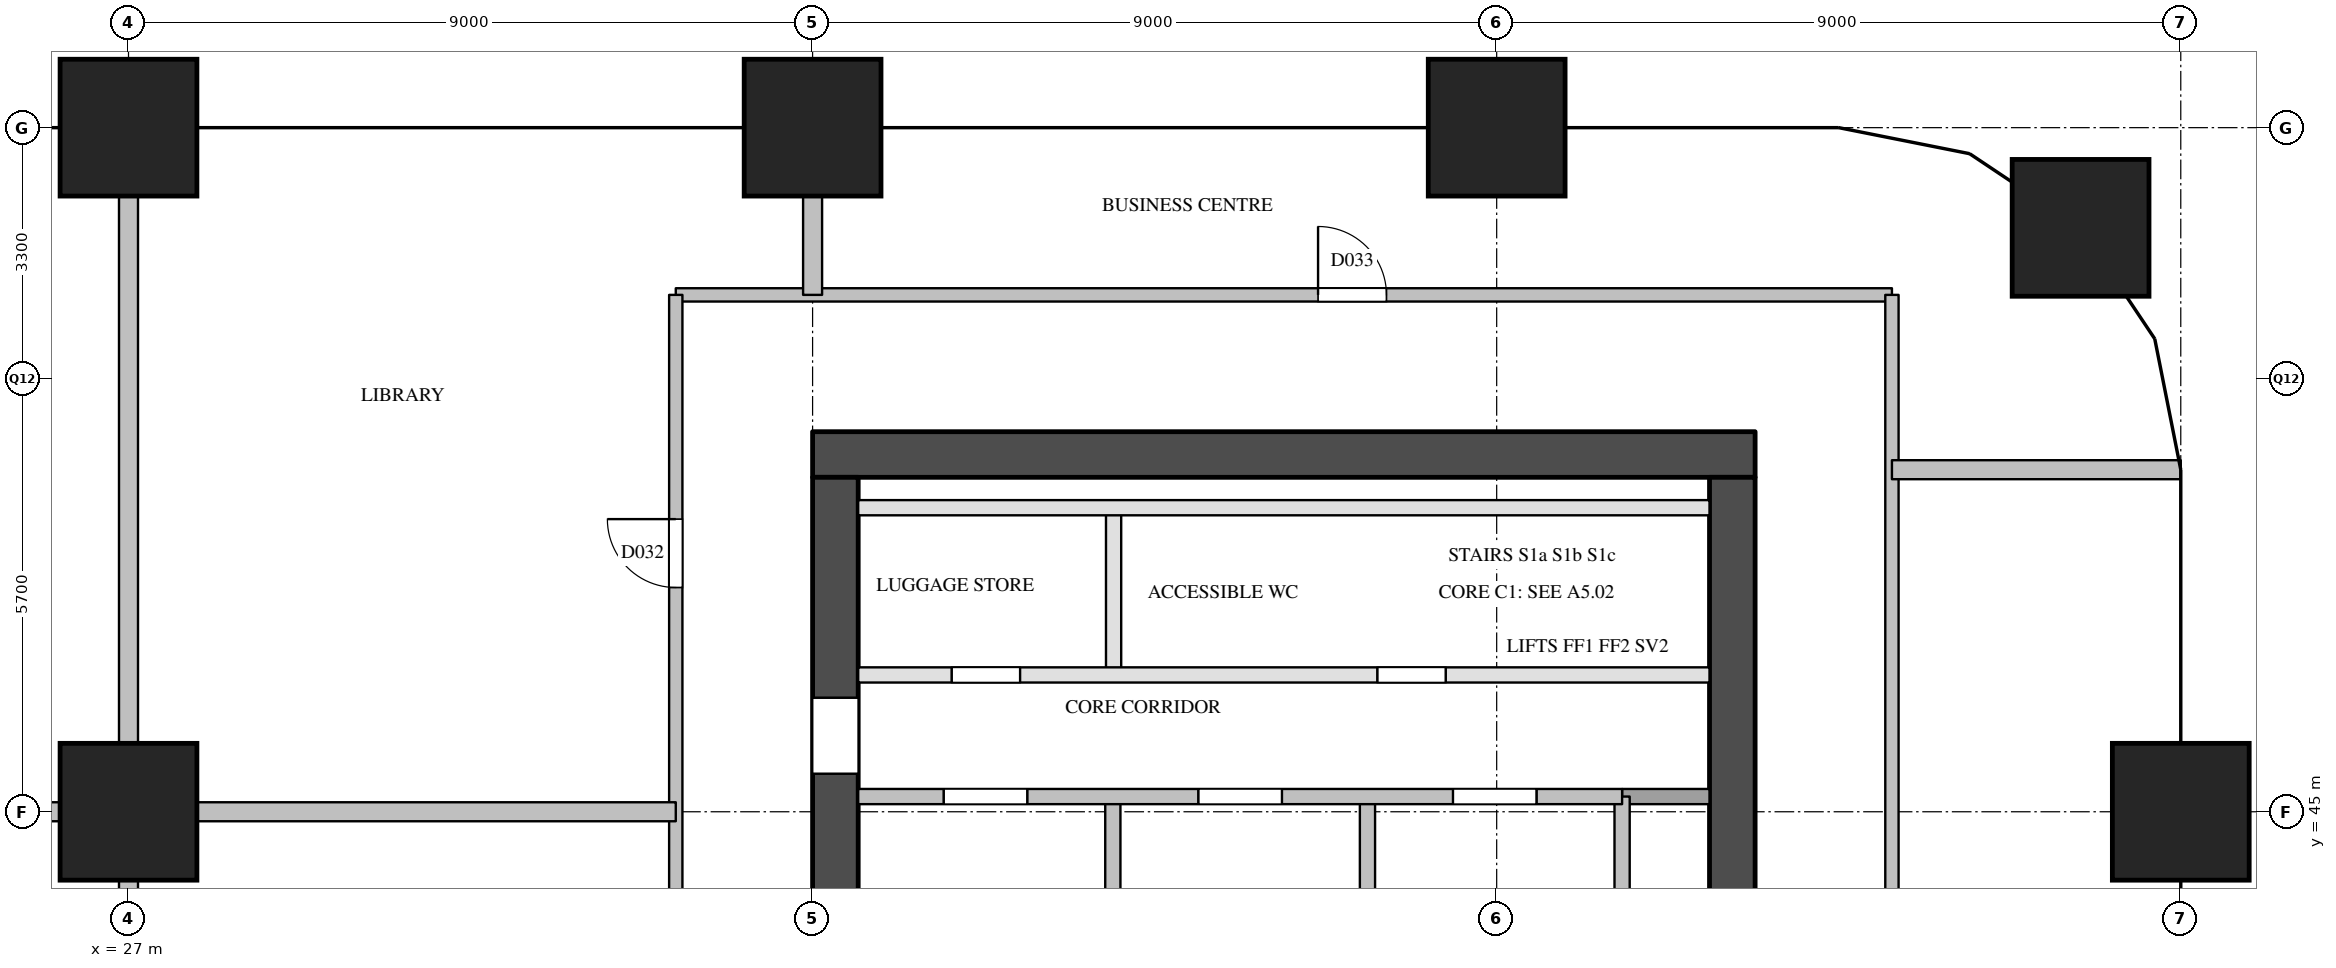
"""IFC4 building model, lengths in metres.
Left out: names, types, materials, properties, quantities, classifications, styles, units other than length and angle.
Written with IfcOpenShell. Run it as: python <this file> out.ifc"""

import sys

from ifc_helpers import new_model, si_unit, direction, frame, frame_2d, origin, origin_2d, place, context, subcontext, project, spatial, rectangle, extrude, element, fill, save


model = new_model("IFC4")
c1 = context("Model", 3, precision=1e-05, world=origin(), true_north=direction((0.0, 1.0)))
c2 = subcontext(c1, "Body", "Model", "MODEL_VIEW")
j1 = project(units=[si_unit("LENGTHUNIT", "METRE"), si_unit("PLANEANGLEUNIT", "RADIAN")], contexts=[c1])
p1 = place(None, origin())
s1 = spatial("IfcSite", under=j1, at=p1, CompositionType="ELEMENT")
p2 = place(p1, origin())
s2 = spatial("IfcBuilding", under=s1, at=p2, CompositionType="ELEMENT")
p3 = place(p2, frame((0.0, 0.0, 104.4)))
s3 = spatial("IfcBuildingStorey", under=s2, at=p3, CompositionType="ELEMENT", Elevation=104.4)
for number, where, z_axis, x_axis in (
    (1, (27.0, 45.0, 0.0), (0.0, 0.0, 1.0), (1.0, 0.0, 0.0)),
    (2, (27.0, 54.0, 0.0), (0.0, 0.0, 1.0), (1.0, 0.0, 0.0)),
    (3, (36.0, 54.0, 0.0), (0.0, 0.0, 1.0), (1.0, 0.0, 0.0)),
    (4, (45.0, 54.0, 0.0), (0.0, 0.0, 1.0), (1.0, 0.0, 0.0)),
    (5, (54.0, 45.0, 0.0), (0.0, 0.0, 1.0), (1.0, 0.0, 0.0)),
    (6, (52.682, 52.682, 0.0), (0.0, 0.0, 1.0), (1.0, 0.0, 0.0)),
):
    element("IfcColumn", number, at=place(p3, frame(where, z_axis=z_axis, x_axis=x_axis)), inside=s3, PredefinedType="COLUMN", context=c2, shape_type="SweptSolid", body=[
        extrude(rectangle(XDim=1.8, YDim=1.8, at=origin_2d()), origin(), (0.0, 0.0, 1.0), 3.8),
    ])
p4 = place(p3, frame((36.0, 49.7, 0.0), z_axis=(0.0, 0.0, 1.0), x_axis=(1.0, 0.0, 0.0)))
e7 = element("IfcWall", 7, at=p4, inside=s3, PredefinedType="SHEAR", context=c2, shape_type="SweptSolid", body=[
    extrude(rectangle(XDim=12.4, YDim=0.6, at=frame_2d((6.2, 0.0))), origin(), (0.0, 0.0, 1.0), 3.5),
])
p5 = place(p3, frame((36.3, 29.1, 0.0), z_axis=(0.0, 0.0, 1.0), x_axis=(0.0, 1.0, 0.0)))
e8 = element("IfcWall", 8, at=p5, inside=s3, PredefinedType="SHEAR", context=c2, shape_type="SweptSolid", body=[
    extrude(rectangle(XDim=20.3, YDim=0.6, at=frame_2d((10.15, 0.0))), origin(), (0.0, 0.0, 1.0), 3.5),
])
p6 = place(p5, frame((3.6, 0.0, 0.0)))
e9 = element("IfcOpeningElement", 9, at=p6, cuts=e8, PredefinedType="OPENING", context=c2, shape_type="SweptSolid", body=[
    extrude(rectangle(XDim=1.8, YDim=2.1, at=frame_2d((0.9, 1.05))), frame((0.0, 0.31, 0.0), z_axis=(0.0, -1.0, 0.0), x_axis=(1.0, 0.0, 0.0)), (0.0, 0.0, 1.0), 0.62),
])
p7 = place(p5, frame((16.4, 0.0, 0.0)))
e10 = element("IfcOpeningElement", 10, at=p7, cuts=e8, PredefinedType="OPENING", context=c2, shape_type="SweptSolid", body=[
    extrude(rectangle(XDim=1.0, YDim=2.1, at=frame_2d((0.5, 1.05))), frame((0.0, 0.31, 0.0), z_axis=(0.0, -1.0, 0.0), x_axis=(1.0, 0.0, 0.0)), (0.0, 0.0, 1.0), 0.62),
])
p8 = place(p3, frame((48.1, 29.1, 0.0), z_axis=(0.0, 0.0, 1.0), x_axis=(0.0, 1.0, 0.0)))
e11 = element("IfcWall", 11, at=p8, inside=s3, PredefinedType="SHEAR", context=c2, shape_type="SweptSolid", body=[
    extrude(rectangle(XDim=20.3, YDim=0.6, at=frame_2d((10.15, 0.0))), origin(), (0.0, 0.0, 1.0), 3.5),
])
p9 = place(p8, frame((12.5, 0.0, 0.0)))
e12 = element("IfcOpeningElement", 12, at=p9, cuts=e11, PredefinedType="OPENING", context=c2, shape_type="SweptSolid", body=[
    extrude(rectangle(XDim=0.7, YDim=2.1, at=frame_2d((0.35, 1.05))), frame((0.0, 0.31, 0.0), z_axis=(0.0, -1.0, 0.0), x_axis=(1.0, 0.0, 0.0)), (0.0, 0.0, 1.0), 0.62),
])
p10 = place(p8, frame((3.9, 0.0, 0.0)))
e13 = element("IfcOpeningElement", 13, at=p10, cuts=e11, PredefinedType="OPENING", context=c2, shape_type="SweptSolid", body=[
    extrude(rectangle(XDim=1.8, YDim=2.1, at=frame_2d((0.9, 1.05))), frame((0.0, 0.31, 0.0), z_axis=(0.0, -1.0, 0.0), x_axis=(1.0, 0.0, 0.0)), (0.0, 0.0, 1.0), 0.62),
])
p11 = place(p3, frame((39.95, 40.78, 0.0), z_axis=(0.0, 0.0, 1.0), x_axis=(0.0, 1.0, 0.0)))
e14 = element("IfcWall", 14, at=p11, inside=s3, PredefinedType="SOLIDWALL", context=c2, shape_type="SweptSolid", body=[
    extrude(rectangle(XDim=4.42, YDim=0.2, at=frame_2d((2.21, 0.0))), origin(), (0.0, 0.0, 1.0), 3.5),
])
p12 = place(p3, frame((39.96, 46.8, 0.0), z_axis=(0.0, 0.0, 1.0), x_axis=(0.0, 1.0, 0.0)))
e15 = element("IfcWall", 15, at=p12, inside=s3, PredefinedType="PARTITIONING", context=c2, shape_type="SweptSolid", body=[
    extrude(rectangle(XDim=2.2, YDim=0.2, at=frame_2d((1.1, 0.0))), origin(), (0.0, 0.0, 1.0), 3.5),
])
for number, where, z_axis, x_axis in (
    (16, (43.3, 40.78, 0.0), (0.0, 0.0, 1.0), (0.0, 1.0, 0.0)),
    (17, (46.65, 40.78, 0.0), (0.0, 0.0, 1.0), (0.0, 1.0, 0.0)),
):
    element("IfcWall", number, at=place(p3, frame(where, z_axis=z_axis, x_axis=x_axis)), inside=s3, PredefinedType="SOLIDWALL", context=c2, shape_type="SweptSolid", body=[
        extrude(rectangle(XDim=4.42, YDim=0.2, at=frame_2d((2.21, 0.0))), origin(), (0.0, 0.0, 1.0), 3.5),
    ])
p13 = place(p3, frame((46.65, 45.2, 0.0), z_axis=(0.0, 0.0, 1.0), x_axis=(1.0, 0.0, 0.0)))
e18 = element("IfcWall", 18, at=p13, inside=s3, PredefinedType="SOLIDWALL", context=c2, shape_type="SweptSolid", body=[
    extrude(rectangle(XDim=1.15, YDim=0.2, at=frame_2d((0.575, 0.0))), origin(), (0.0, 0.0, 1.0), 3.5),
])
p14 = place(p3, frame((36.6, 45.2, 0.0), z_axis=(0.0, 0.0, 1.0), x_axis=(1.0, 0.0, 0.0)))
e19 = element("IfcWall", 19, at=p14, inside=s3, PredefinedType="SOLIDWALL", context=c2, shape_type="SweptSolid", body=[
    extrude(rectangle(XDim=10.05, YDim=0.2, at=frame_2d((5.025, 0.0))), origin(), (0.0, 0.0, 1.0), 3.5),
])
p15 = place(p14, frame((1.125, 0.0, 0.0)))
e20 = element("IfcOpeningElement", 20, at=p15, cuts=e19, PredefinedType="OPENING", context=c2, shape_type="SweptSolid", body=[
    extrude(rectangle(XDim=1.1, YDim=2.1, at=frame_2d((0.55, 1.05))), frame((0.0, 0.11, 0.0), z_axis=(0.0, -1.0, 0.0), x_axis=(1.0, 0.0, 0.0)), (0.0, 0.0, 1.0), 0.22),
])
p16 = place(p14, frame((4.475, 0.0, 0.0)))
e21 = element("IfcOpeningElement", 21, at=p16, cuts=e19, PredefinedType="OPENING", context=c2, shape_type="SweptSolid", body=[
    extrude(rectangle(XDim=1.1, YDim=2.1, at=frame_2d((0.55, 1.05))), frame((0.0, 0.11, 0.0), z_axis=(0.0, -1.0, 0.0), x_axis=(1.0, 0.0, 0.0)), (0.0, 0.0, 1.0), 0.22),
])
p17 = place(p14, frame((7.825, 0.0, 0.0)))
e22 = element("IfcOpeningElement", 22, at=p17, cuts=e19, PredefinedType="OPENING", context=c2, shape_type="SweptSolid", body=[
    extrude(rectangle(XDim=1.1, YDim=2.1, at=frame_2d((0.55, 1.05))), frame((0.0, 0.11, 0.0), z_axis=(0.0, -1.0, 0.0), x_axis=(1.0, 0.0, 0.0)), (0.0, 0.0, 1.0), 0.22),
])
p18 = place(p3, frame((36.6, 46.8, 0.0), z_axis=(0.0, 0.0, 1.0), x_axis=(1.0, 0.0, 0.0)))
e23 = element("IfcWall", 23, at=p18, inside=s3, PredefinedType="PARTITIONING", context=c2, shape_type="SweptSolid", body=[
    extrude(rectangle(XDim=11.2, YDim=0.2, at=frame_2d((5.6, 0.0))), origin(), (0.0, 0.0, 1.0), 3.5),
])
p19 = place(p18, frame((1.23, 0.0, 0.0)))
e24 = element("IfcOpeningElement", 24, at=p19, cuts=e23, PredefinedType="OPENING", context=c2, shape_type="SweptSolid", body=[
    extrude(rectangle(XDim=0.9, YDim=2.1, at=frame_2d((0.45, 1.05))), frame((0.0, 0.11, 0.0), z_axis=(0.0, -1.0, 0.0), x_axis=(1.0, 0.0, 0.0)), (0.0, 0.0, 1.0), 0.22),
])
p20 = place(p18, frame((6.83, 0.0, 0.0)))
e25 = element("IfcOpeningElement", 25, at=p20, cuts=e23, PredefinedType="OPENING", context=c2, shape_type="SweptSolid", body=[
    extrude(rectangle(XDim=0.9, YDim=2.1, at=frame_2d((0.45, 1.05))), frame((0.0, 0.11, 0.0), z_axis=(0.0, -1.0, 0.0), x_axis=(1.0, 0.0, 0.0)), (0.0, 0.0, 1.0), 0.22),
])
p21 = place(p3, frame((36.6, 49.0, 0.0), z_axis=(0.0, 0.0, 1.0), x_axis=(1.0, 0.0, 0.0)))
e26 = element("IfcWall", 26, at=p21, inside=s3, PredefinedType="PARTITIONING", context=c2, shape_type="SweptSolid", body=[
    extrude(rectangle(XDim=11.2, YDim=0.2, at=frame_2d((5.6, 0.0))), origin(), (0.0, 0.0, 1.0), 3.5),
])
p22 = place(p3, frame((34.2, 51.8, 0.0), z_axis=(0.0, 0.0, 1.0), x_axis=(1.0, 0.0, 0.0)))
e27 = element("IfcWall", 27, at=p22, inside=s3, PredefinedType="PARTITIONING", context=c2, shape_type="SweptSolid", body=[
    extrude(rectangle(XDim=16.0, YDim=0.175, at=frame_2d((8.0, 0.0))), origin(), (0.0, 0.0, 1.0), 3.5),
])
p23 = place(p22, frame((8.45, 0.0, 0.0)))
e28 = element("IfcOpeningElement", 28, at=p23, cuts=e27, PredefinedType="OPENING", context=c2, shape_type="SweptSolid", body=[
    extrude(rectangle(XDim=0.9, YDim=2.1, at=frame_2d((0.45, 1.05))), frame((0.0, 0.097, 0.0), z_axis=(0.0, -1.0, 0.0), x_axis=(1.0, 0.0, 0.0)), (0.0, 0.0, 1.0), 0.195),
])
p24 = place(p3, frame((34.2, 29.12, 0.0), z_axis=(0.0, 0.0, 1.0), x_axis=(0.0, 1.0, 0.0)))
e29 = element("IfcWall", 29, at=p24, inside=s3, PredefinedType="PARTITIONING", context=c2, shape_type="SweptSolid", body=[
    extrude(rectangle(XDim=22.68, YDim=0.175, at=frame_2d((11.34, 0.0))), origin(), (0.0, 0.0, 1.0), 3.5),
])
p25 = place(p24, frame((3.08, 0.0, 0.0)))
e30 = element("IfcOpeningElement", 30, at=p25, cuts=e29, PredefinedType="OPENING", context=c2, shape_type="SweptSolid", body=[
    extrude(rectangle(XDim=1.0, YDim=2.1, at=frame_2d((0.5, 1.05))), frame((0.0, 0.097, 0.0), z_axis=(0.0, -1.0, 0.0), x_axis=(1.0, 0.0, 0.0)), (0.0, 0.0, 1.0), 0.195),
])
p26 = place(p24, frame((8.68, 0.0, 0.0)))
e31 = element("IfcOpeningElement", 31, at=p26, cuts=e29, PredefinedType="OPENING", context=c2, shape_type="SweptSolid", body=[
    extrude(rectangle(XDim=0.9, YDim=2.1, at=frame_2d((0.45, 1.05))), frame((0.0, 0.097, 0.0), z_axis=(0.0, -1.0, 0.0), x_axis=(1.0, 0.0, 0.0)), (0.0, 0.0, 1.0), 0.195),
])
p27 = place(p24, frame((13.13, 0.0, 0.0)))
e32 = element("IfcOpeningElement", 32, at=p27, cuts=e29, PredefinedType="OPENING", context=c2, shape_type="SweptSolid", body=[
    extrude(rectangle(XDim=1.0, YDim=2.1, at=frame_2d((0.5, 1.05))), frame((0.0, 0.097, 0.0), z_axis=(0.0, -1.0, 0.0), x_axis=(1.0, 0.0, 0.0)), (0.0, 0.0, 1.0), 0.195),
])
p28 = place(p24, frame((18.83, 0.0, 0.0)))
e33 = element("IfcOpeningElement", 33, at=p28, cuts=e29, PredefinedType="OPENING", context=c2, shape_type="SweptSolid", body=[
    extrude(rectangle(XDim=0.9, YDim=2.1, at=frame_2d((0.45, 1.05))), frame((0.0, 0.097, 0.0), z_axis=(0.0, -1.0, 0.0), x_axis=(1.0, 0.0, 0.0)), (0.0, 0.0, 1.0), 0.195),
])
p29 = place(p3, frame((50.2, 26.7, 0.0), z_axis=(0.0, 0.0, 1.0), x_axis=(0.0, 1.0, 0.0)))
e34 = element("IfcWall", 34, at=p29, inside=s3, PredefinedType="PARTITIONING", context=c2, shape_type="SweptSolid", body=[
    extrude(rectangle(XDim=25.1, YDim=0.175, at=frame_2d((12.55, 0.0))), origin(), (0.0, 0.0, 1.0), 2.5),
])
p30 = place(p29, frame((4.2, 0.0, 0.0)))
e35 = element("IfcOpeningElement", 35, at=p30, cuts=e34, PredefinedType="OPENING", context=c2, shape_type="SweptSolid", body=[
    extrude(rectangle(XDim=0.9, YDim=2.1, at=frame_2d((0.45, 1.05))), frame((0.0, 0.097, 0.0), z_axis=(0.0, -1.0, 0.0), x_axis=(1.0, 0.0, 0.0)), (0.0, 0.0, 1.0), 0.195),
])
p31 = place(p29, frame((15.6, 0.0, 0.0)))
e36 = element("IfcOpeningElement", 36, at=p31, cuts=e34, PredefinedType="OPENING", context=c2, shape_type="SweptSolid", body=[
    extrude(rectangle(XDim=0.9, YDim=2.1, at=frame_2d((0.45, 1.05))), frame((0.0, 0.097, 0.0), z_axis=(0.0, -1.0, 0.0), x_axis=(1.0, 0.0, 0.0)), (0.0, 0.0, 1.0), 0.195),
])
p32 = place(p3, frame((19.8, 45.0, 0.0), z_axis=(0.0, 0.0, 1.0), x_axis=(1.0, 0.0, 0.0)))
e37 = element("IfcWall", 37, at=p32, inside=s3, PredefinedType="PARTITIONING", context=c2, shape_type="SweptSolid", body=[
    extrude(rectangle(XDim=14.4, YDim=0.25, at=frame_2d((7.2, 0.0))), origin(), (0.0, 0.0, 1.0), 3.5),
])
p33 = place(p3, frame((50.2, 49.5, 0.0), z_axis=(0.0, 0.0, 1.0), x_axis=(1.0, 0.0, 0.0)))
e38 = element("IfcWall", 38, at=p33, inside=s3, PredefinedType="PARTITIONING", context=c2, shape_type="SweptSolid", body=[
    extrude(rectangle(XDim=3.8, YDim=0.25, at=frame_2d((1.9, 0.0))), origin(), (0.0, 0.0, 1.0), 2.5),
])
p34 = place(p3, frame((27.0, 36.0, 0.0), z_axis=(0.0, 0.0, 1.0), x_axis=(0.0, 1.0, 0.0)))
e39 = element("IfcWall", 39, at=p34, inside=s3, PredefinedType="PARTITIONING", context=c2, shape_type="SweptSolid", body=[
    extrude(rectangle(XDim=18.0, YDim=0.25, at=frame_2d((9.0, 0.0))), origin(), (0.0, 0.0, 1.0), 2.5),
])
p35 = place(p3, frame((36.0, 51.8, 0.0), z_axis=(0.0, 0.0, 1.0), x_axis=(0.0, 1.0, 0.0)))
e40 = element("IfcWall", 40, at=p35, inside=s3, PredefinedType="PARTITIONING", context=c2, shape_type="SweptSolid", body=[
    extrude(rectangle(XDim=2.2, YDim=0.25, at=frame_2d((1.1, 0.0))), origin(), (0.0, 0.0, 1.0), 3.5),
])
p36 = place(p15, origin())
e41 = element("IfcDoor", 41, at=p36, inside=s3, OperationType="SINGLE_SWING_LEFT", PredefinedType="DOOR", context=c2, shape_type="SweptSolid", body=[
    extrude(rectangle(XDim=1.1, YDim=2.1, at=frame_2d((0.55, 1.05))), frame((0.0, 0.025, 0.0), z_axis=(0.0, -1.0, 0.0), x_axis=(1.0, 0.0, 0.0)), (0.0, 0.0, 1.0), 0.05),
])
fill(e20, e41)
p37 = place(p16, origin())
e42 = element("IfcDoor", 42, at=p37, inside=s3, OperationType="SINGLE_SWING_RIGHT", PredefinedType="DOOR", context=c2, shape_type="SweptSolid", body=[
    extrude(rectangle(XDim=1.1, YDim=2.1, at=frame_2d((0.55, 1.05))), frame((0.0, 0.025, 0.0), z_axis=(0.0, -1.0, 0.0), x_axis=(1.0, 0.0, 0.0)), (0.0, 0.0, 1.0), 0.05),
])
fill(e21, e42)
p38 = place(p17, origin())
e43 = element("IfcDoor", 43, at=p38, inside=s3, OperationType="SINGLE_SWING_RIGHT", PredefinedType="DOOR", context=c2, shape_type="SweptSolid", body=[
    extrude(rectangle(XDim=1.1, YDim=2.1, at=frame_2d((0.55, 1.05))), frame((0.0, 0.025, 0.0), z_axis=(0.0, -1.0, 0.0), x_axis=(1.0, 0.0, 0.0)), (0.0, 0.0, 1.0), 0.05),
])
fill(e22, e43)
p39 = place(p7, origin())
e44 = element("IfcDoor", 44, at=p39, inside=s3, OperationType="SINGLE_SWING_RIGHT", PredefinedType="DOOR", context=c2, shape_type="SweptSolid", body=[
    extrude(rectangle(XDim=1.0, YDim=2.1, at=frame_2d((0.5, 1.05))), frame((0.0, 0.025, 0.0), z_axis=(0.0, -1.0, 0.0), x_axis=(1.0, 0.0, 0.0)), (0.0, 0.0, 1.0), 0.05),
])
fill(e10, e44)
p40 = place(p19, origin())
e45 = element("IfcDoor", 45, at=p40, inside=s3, OperationType="SINGLE_SWING_LEFT", PredefinedType="DOOR", context=c2, shape_type="SweptSolid", body=[
    extrude(rectangle(XDim=0.9, YDim=2.1, at=frame_2d((0.45, 1.05))), frame((0.0, 0.025, 0.0), z_axis=(0.0, -1.0, 0.0), x_axis=(1.0, 0.0, 0.0)), (0.0, 0.0, 1.0), 0.05),
])
fill(e24, e45)
p41 = place(p20, origin())
e46 = element("IfcDoor", 46, at=p41, inside=s3, OperationType="SINGLE_SWING_RIGHT", PredefinedType="DOOR", context=c2, shape_type="SweptSolid", body=[
    extrude(rectangle(XDim=0.9, YDim=2.1, at=frame_2d((0.45, 1.05))), frame((0.0, 0.025, 0.0), z_axis=(0.0, -1.0, 0.0), x_axis=(1.0, 0.0, 0.0)), (0.0, 0.0, 1.0), 0.05),
])
fill(e25, e46)
p42 = place(p28, origin())
e47 = element("IfcDoor", 47, at=p42, inside=s3, OperationType="SINGLE_SWING_RIGHT", PredefinedType="DOOR", context=c2, shape_type="SweptSolid", body=[
    extrude(rectangle(XDim=0.9, YDim=2.1, at=frame_2d((0.45, 1.05))), frame((0.0, 0.025, 0.0), z_axis=(0.0, -1.0, 0.0), x_axis=(1.0, 0.0, 0.0)), (0.0, 0.0, 1.0), 0.05),
])
fill(e33, e47)
p43 = place(p23, origin())
e48 = element("IfcDoor", 48, at=p43, inside=s3, OperationType="SINGLE_SWING_LEFT", PredefinedType="DOOR", context=c2, shape_type="SweptSolid", body=[
    extrude(rectangle(XDim=0.9, YDim=2.1, at=frame_2d((0.45, 1.05))), frame((0.0, 0.025, 0.0), z_axis=(0.0, -1.0, 0.0), x_axis=(1.0, 0.0, 0.0)), (0.0, 0.0, 1.0), 0.05),
])
fill(e28, e48)
save(model, sys.argv[1])
